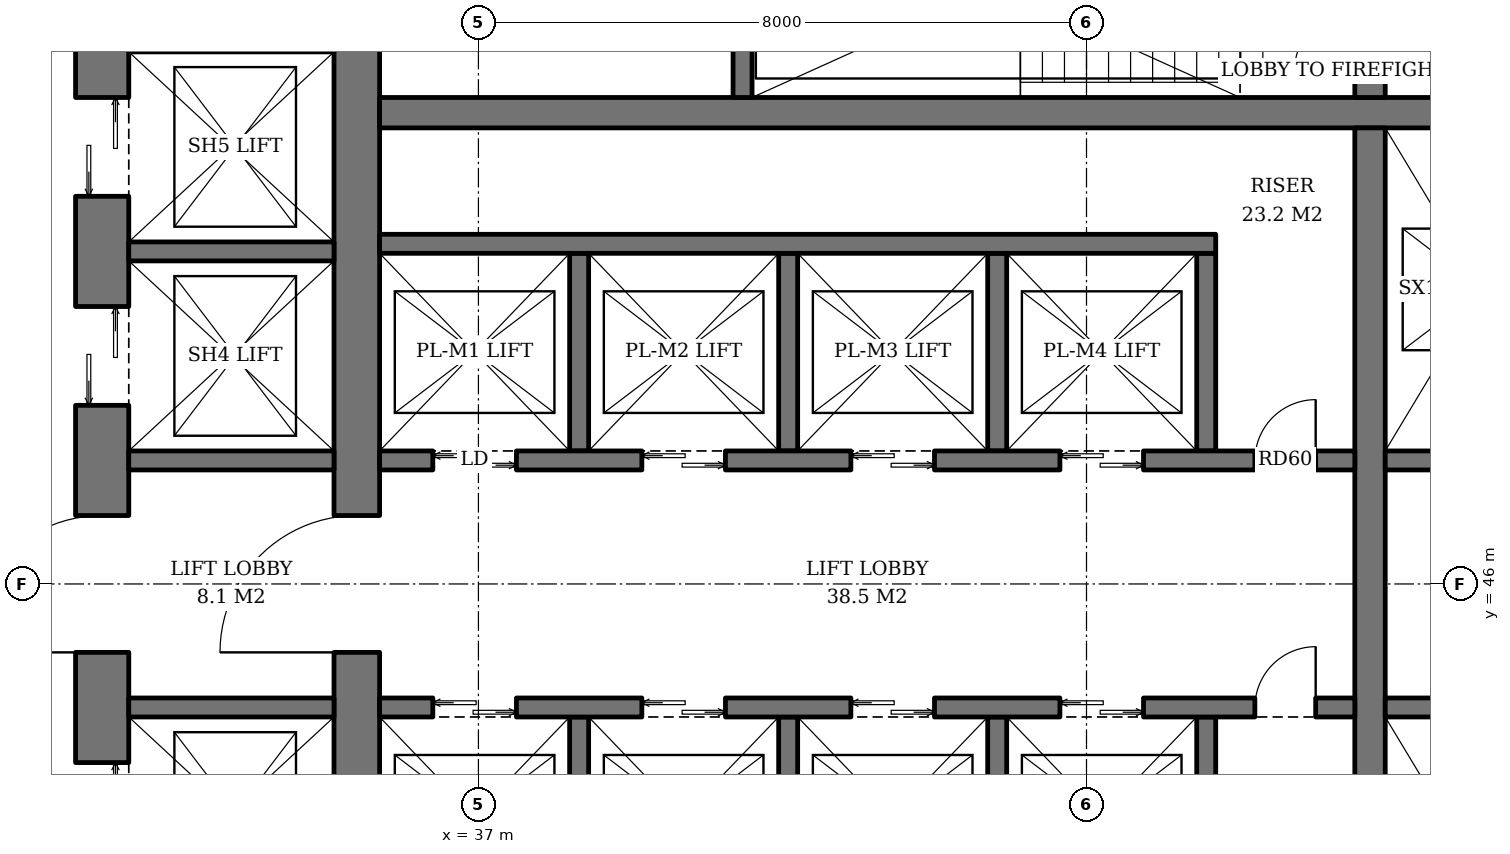
"""IFC4 building model, lengths in metres.
Left out: names, types, materials, properties, quantities, classifications, styles, units other than length and angle.
Written with IfcOpenShell. Run it as: python <this file> out.ifc"""

import sys

from ifc_helpers import new_model, si_unit, direction, frame, frame_2d, origin, place, context, subcontext, project, spatial, rectangle, extrude, element, fill, save


model = new_model("IFC4")
c1 = context("Model", 3, precision=1e-05, world=origin(), true_north=direction((0.0, 1.0)))
c2 = subcontext(c1, "Body", "Model", "MODEL_VIEW")
j1 = project(units=[si_unit("LENGTHUNIT", "METRE"), si_unit("PLANEANGLEUNIT", "RADIAN")], contexts=[c1])
p1 = place(None, origin())
s1 = spatial("IfcSite", under=j1, at=p1, CompositionType="ELEMENT")
p2 = place(p1, origin())
s2 = spatial("IfcBuilding", under=s1, at=p2, CompositionType="ELEMENT")
p3 = place(p2, frame((0.0, 0.0, 93.2)))
s3 = spatial("IfcBuildingStorey", under=s2, at=p3, CompositionType="ELEMENT", Elevation=93.2)
p4 = place(p3, frame((35.4, 36.7, 0.0), z_axis=(0.0, 0.0, 1.0), x_axis=(0.0, 1.0, 0.0)))
e1 = element("IfcWall", 1, at=p4, inside=s3, PredefinedType="SHEAR", context=c2, shape_type="SweptSolid", body=[
    extrude(rectangle(XDim=18.6, YDim=0.6, at=frame_2d((9.3, 0.0))), origin(), (0.0, 0.0, 1.0), 3.8),
])
p5 = place(p4, frame((8.4, 0.0, 0.0)))
e2 = element("IfcOpeningElement", 2, at=p5, cuts=e1, PredefinedType="OPENING", context=c2, shape_type="SweptSolid", body=[
    extrude(rectangle(XDim=1.8, YDim=2.4, at=frame_2d((0.9, 1.2))), frame((0.0, 0.31, 0.0), z_axis=(0.0, -1.0, 0.0), x_axis=(1.0, 0.0, 0.0)), (0.0, 0.0, 1.0), 0.62),
])
p6 = place(p3, frame((32.05, 33.4, 0.0), z_axis=(0.0, 0.0, 1.0), x_axis=(0.0, 1.0, 0.0)))
e3 = element("IfcWall", 3, at=p6, inside=s3, PredefinedType="SHEAR", context=c2, shape_type="SweptSolid", body=[
    extrude(rectangle(XDim=25.2, YDim=0.7, at=frame_2d((12.6, 0.0))), origin(), (0.0, 0.0, 1.0), 3.8),
])
p7 = place(p6, frame((3.45, 0.0, 0.0)))
e4 = element("IfcOpeningElement", 4, at=p7, cuts=e3, PredefinedType="OPENING", context=c2, shape_type="SweptSolid", body=[
    extrude(rectangle(XDim=1.3, YDim=2.2, at=frame_2d((0.65, 1.1))), frame((0.0, 0.36, 0.0), z_axis=(0.0, -1.0, 0.0), x_axis=(1.0, 0.0, 0.0)), (0.0, 0.0, 1.0), 0.72),
])
p8 = place(p6, frame((6.2, 0.0, 0.0)))
e5 = element("IfcOpeningElement", 5, at=p8, cuts=e3, PredefinedType="OPENING", context=c2, shape_type="SweptSolid", body=[
    extrude(rectangle(XDim=1.3, YDim=2.2, at=frame_2d((0.65, 1.1))), frame((0.0, 0.36, 0.0), z_axis=(0.0, -1.0, 0.0), x_axis=(1.0, 0.0, 0.0)), (0.0, 0.0, 1.0), 0.72),
])
p9 = place(p6, frame((8.95, 0.0, 0.0)))
e6 = element("IfcOpeningElement", 6, at=p9, cuts=e3, PredefinedType="OPENING", context=c2, shape_type="SweptSolid", body=[
    extrude(rectangle(XDim=1.3, YDim=2.2, at=frame_2d((0.65, 1.1))), frame((0.0, 0.36, 0.0), z_axis=(0.0, -1.0, 0.0), x_axis=(1.0, 0.0, 0.0)), (0.0, 0.0, 1.0), 0.72),
])
p10 = place(p6, frame((14.95, 0.0, 0.0)))
e7 = element("IfcOpeningElement", 7, at=p10, cuts=e3, PredefinedType="OPENING", context=c2, shape_type="SweptSolid", body=[
    extrude(rectangle(XDim=1.3, YDim=2.2, at=frame_2d((0.65, 1.1))), frame((0.0, 0.36, 0.0), z_axis=(0.0, -1.0, 0.0), x_axis=(1.0, 0.0, 0.0)), (0.0, 0.0, 1.0), 0.72),
])
p11 = place(p6, frame((17.7, 0.0, 0.0)))
e8 = element("IfcOpeningElement", 8, at=p11, cuts=e3, PredefinedType="OPENING", context=c2, shape_type="SweptSolid", body=[
    extrude(rectangle(XDim=1.3, YDim=2.2, at=frame_2d((0.65, 1.1))), frame((0.0, 0.36, 0.0), z_axis=(0.0, -1.0, 0.0), x_axis=(1.0, 0.0, 0.0)), (0.0, 0.0, 1.0), 0.72),
])
p12 = place(p6, frame((11.7, 0.0, 0.0)))
e9 = element("IfcOpeningElement", 9, at=p12, cuts=e3, PredefinedType="OPENING", context=c2, shape_type="SweptSolid", body=[
    extrude(rectangle(XDim=1.8, YDim=2.4, at=frame_2d((0.9, 1.2))), frame((0.0, 0.36, 0.0), z_axis=(0.0, -1.0, 0.0), x_axis=(1.0, 0.0, 0.0)), (0.0, 0.0, 1.0), 0.72),
])
p13 = place(p3, frame((35.7, 52.2, 0.0), z_axis=(0.0, 0.0, 1.0), x_axis=(1.0, 0.0, 0.0)))
e10 = element("IfcWall", 10, at=p13, inside=s3, PredefinedType="SHEAR", context=c2, shape_type="SweptSolid", body=[
    extrude(rectangle(XDim=18.6, YDim=0.4, at=frame_2d((9.3, 0.0))), origin(), (0.0, 0.0, 1.0), 3.8),
])
p14 = place(p3, frame((48.73, 40.0, 0.0), z_axis=(0.0, 0.0, 1.0), x_axis=(0.0, 1.0, 0.0)))
e11 = element("IfcWall", 11, at=p14, inside=s3, PredefinedType="SHEAR", context=c2, shape_type="SweptSolid", body=[
    extrude(rectangle(XDim=12.0, YDim=0.4, at=frame_2d((6.0, 0.0))), origin(), (0.0, 0.0, 1.0), 3.8),
])
p15 = place(p3, frame((48.73, 52.4, 0.0), z_axis=(0.0, 0.0, 1.0), x_axis=(0.0, 1.0, 0.0)))
e12 = element("IfcWall", 12, at=p15, inside=s3, PredefinedType="SHEAR", context=c2, shape_type="SweptSolid", body=[
    extrude(rectangle(XDim=2.9, YDim=0.4, at=frame_2d((1.45, 0.0))), origin(), (0.0, 0.0, 1.0), 3.8),
])
p16 = place(p15, frame((0.3, 0.0, 0.0)))
e13 = element("IfcOpeningElement", 13, at=p16, cuts=e12, PredefinedType="OPENING", context=c2, shape_type="SweptSolid", body=[
    extrude(rectangle(XDim=1.0, YDim=2.1, at=frame_2d((0.5, 1.05))), frame((0.0, 0.21, 0.0), z_axis=(0.0, -1.0, 0.0), x_axis=(1.0, 0.0, 0.0)), (0.0, 0.0, 1.0), 0.42),
])
p17 = place(p3, frame((40.475, 52.4, 0.0), z_axis=(0.0, 0.0, 1.0), x_axis=(0.0, 1.0, 0.0)))
e14 = element("IfcWall", 14, at=p17, inside=s3, PredefinedType="SHEAR", context=c2, shape_type="SweptSolid", body=[
    extrude(rectangle(XDim=2.9, YDim=0.25, at=frame_2d((1.45, 0.0))), origin(), (0.0, 0.0, 1.0), 3.8),
])
for number, where, z_axis, x_axis in (
    (15, (38.325, 47.75, 0.0), (0.0, 0.0, 1.0), (0.0, 1.0, 0.0)),
    (16, (41.075, 47.75, 0.0), (0.0, 0.0, 1.0), (0.0, 1.0, 0.0)),
    (17, (43.825, 47.75, 0.0), (0.0, 0.0, 1.0), (0.0, 1.0, 0.0)),
    (18, (46.575, 47.75, 0.0), (0.0, 0.0, 1.0), (0.0, 1.0, 0.0)),
):
    element("IfcWall", number, at=place(p3, frame(where, z_axis=z_axis, x_axis=x_axis)), inside=s3, PredefinedType="SHEAR", context=c2, shape_type="SweptSolid", body=[
        extrude(rectangle(XDim=2.6, YDim=0.25, at=frame_2d((1.3, 0.0))), origin(), (0.0, 0.0, 1.0), 3.8),
    ])
p18 = place(p3, frame((35.7, 50.475, 0.0), z_axis=(0.0, 0.0, 1.0), x_axis=(1.0, 0.0, 0.0)))
e19 = element("IfcWall", 19, at=p18, inside=s3, PredefinedType="SHEAR", context=c2, shape_type="SweptSolid", body=[
    extrude(rectangle(XDim=11.0, YDim=0.25, at=frame_2d((5.5, 0.0))), origin(), (0.0, 0.0, 1.0), 3.8),
])
p19 = place(p3, frame((35.7, 47.625, 0.0), z_axis=(0.0, 0.0, 1.0), x_axis=(1.0, 0.0, 0.0)))
e20 = element("IfcWall", 20, at=p19, inside=s3, PredefinedType="SHEAR", context=c2, shape_type="SweptSolid", body=[
    extrude(rectangle(XDim=12.83, YDim=0.25, at=frame_2d((6.415, 0.0))), origin(), (0.0, 0.0, 1.0), 3.8),
])
p20 = place(p19, frame((0.7, 0.0, 0.0)))
e21 = element("IfcOpeningElement", 21, at=p20, cuts=e20, PredefinedType="OPENING", context=c2, shape_type="SweptSolid", body=[
    extrude(rectangle(XDim=1.1, YDim=2.2, at=frame_2d((0.55, 1.1))), frame((0.0, 0.135, 0.0), z_axis=(0.0, -1.0, 0.0), x_axis=(1.0, 0.0, 0.0)), (0.0, 0.0, 1.0), 0.27),
])
p21 = place(p19, frame((3.45, 0.0, 0.0)))
e22 = element("IfcOpeningElement", 22, at=p21, cuts=e20, PredefinedType="OPENING", context=c2, shape_type="SweptSolid", body=[
    extrude(rectangle(XDim=1.1, YDim=2.2, at=frame_2d((0.55, 1.1))), frame((0.0, 0.135, 0.0), z_axis=(0.0, -1.0, 0.0), x_axis=(1.0, 0.0, 0.0)), (0.0, 0.0, 1.0), 0.27),
])
p22 = place(p19, frame((6.2, 0.0, 0.0)))
e23 = element("IfcOpeningElement", 23, at=p22, cuts=e20, PredefinedType="OPENING", context=c2, shape_type="SweptSolid", body=[
    extrude(rectangle(XDim=1.1, YDim=2.2, at=frame_2d((0.55, 1.1))), frame((0.0, 0.135, 0.0), z_axis=(0.0, -1.0, 0.0), x_axis=(1.0, 0.0, 0.0)), (0.0, 0.0, 1.0), 0.27),
])
p23 = place(p19, frame((8.95, 0.0, 0.0)))
e24 = element("IfcOpeningElement", 24, at=p23, cuts=e20, PredefinedType="OPENING", context=c2, shape_type="SweptSolid", body=[
    extrude(rectangle(XDim=1.1, YDim=2.2, at=frame_2d((0.55, 1.1))), frame((0.0, 0.135, 0.0), z_axis=(0.0, -1.0, 0.0), x_axis=(1.0, 0.0, 0.0)), (0.0, 0.0, 1.0), 0.27),
])
p24 = place(p19, frame((11.515, 0.0, 0.0)))
e25 = element("IfcOpeningElement", 25, at=p24, cuts=e20, PredefinedType="OPENING", context=c2, shape_type="SweptSolid", body=[
    extrude(rectangle(XDim=0.8, YDim=2.0, at=frame_2d((0.4, 1.0))), frame((0.0, 0.135, 0.0), z_axis=(0.0, -1.0, 0.0), x_axis=(1.0, 0.0, 0.0)), (0.0, 0.0, 1.0), 0.27),
])
for number, where, z_axis, x_axis in (
    (26, (38.325, 44.25, 0.0), (0.0, 0.0, 1.0), (0.0, -1.0, 0.0)),
    (27, (41.075, 44.25, 0.0), (0.0, 0.0, 1.0), (0.0, -1.0, 0.0)),
    (28, (43.825, 44.25, 0.0), (0.0, 0.0, 1.0), (0.0, -1.0, 0.0)),
    (29, (46.575, 44.25, 0.0), (0.0, 0.0, 1.0), (0.0, -1.0, 0.0)),
):
    element("IfcWall", number, at=place(p3, frame(where, z_axis=z_axis, x_axis=x_axis)), inside=s3, PredefinedType="SHEAR", context=c2, shape_type="SweptSolid", body=[
        extrude(rectangle(XDim=2.6, YDim=0.25, at=frame_2d((1.3, 0.0))), origin(), (0.0, 0.0, 1.0), 3.8),
    ])
p25 = place(p3, frame((35.7, 44.375, 0.0), z_axis=(0.0, 0.0, 1.0), x_axis=(1.0, 0.0, 0.0)))
e30 = element("IfcWall", 30, at=p25, inside=s3, PredefinedType="SHEAR", context=c2, shape_type="SweptSolid", body=[
    extrude(rectangle(XDim=12.83, YDim=0.25, at=frame_2d((6.415, 0.0))), origin(), (0.0, 0.0, 1.0), 3.8),
])
p26 = place(p25, frame((0.7, 0.0, 0.0)))
e31 = element("IfcOpeningElement", 31, at=p26, cuts=e30, PredefinedType="OPENING", context=c2, shape_type="SweptSolid", body=[
    extrude(rectangle(XDim=1.1, YDim=2.2, at=frame_2d((0.55, 1.1))), frame((0.0, 0.135, 0.0), z_axis=(0.0, -1.0, 0.0), x_axis=(1.0, 0.0, 0.0)), (0.0, 0.0, 1.0), 0.27),
])
p27 = place(p25, frame((3.45, 0.0, 0.0)))
e32 = element("IfcOpeningElement", 32, at=p27, cuts=e30, PredefinedType="OPENING", context=c2, shape_type="SweptSolid", body=[
    extrude(rectangle(XDim=1.1, YDim=2.2, at=frame_2d((0.55, 1.1))), frame((0.0, 0.135, 0.0), z_axis=(0.0, -1.0, 0.0), x_axis=(1.0, 0.0, 0.0)), (0.0, 0.0, 1.0), 0.27),
])
p28 = place(p25, frame((6.2, 0.0, 0.0)))
e33 = element("IfcOpeningElement", 33, at=p28, cuts=e30, PredefinedType="OPENING", context=c2, shape_type="SweptSolid", body=[
    extrude(rectangle(XDim=1.1, YDim=2.2, at=frame_2d((0.55, 1.1))), frame((0.0, 0.135, 0.0), z_axis=(0.0, -1.0, 0.0), x_axis=(1.0, 0.0, 0.0)), (0.0, 0.0, 1.0), 0.27),
])
p29 = place(p25, frame((8.95, 0.0, 0.0)))
e34 = element("IfcOpeningElement", 34, at=p29, cuts=e30, PredefinedType="OPENING", context=c2, shape_type="SweptSolid", body=[
    extrude(rectangle(XDim=1.1, YDim=2.2, at=frame_2d((0.55, 1.1))), frame((0.0, 0.135, 0.0), z_axis=(0.0, -1.0, 0.0), x_axis=(1.0, 0.0, 0.0)), (0.0, 0.0, 1.0), 0.27),
])
p30 = place(p25, frame((11.515, 0.0, 0.0)))
e35 = element("IfcOpeningElement", 35, at=p30, cuts=e30, PredefinedType="OPENING", context=c2, shape_type="SweptSolid", body=[
    extrude(rectangle(XDim=0.8, YDim=2.0, at=frame_2d((0.4, 1.0))), frame((0.0, 0.135, 0.0), z_axis=(0.0, -1.0, 0.0), x_axis=(1.0, 0.0, 0.0)), (0.0, 0.0, 1.0), 0.27),
])
for number, where, z_axis, x_axis in (
    (36, (48.93, 47.625, 0.0), (0.0, 0.0, 1.0), (1.0, 0.0, 0.0)),
    (37, (48.93, 44.375, 0.0), (0.0, 0.0, 1.0), (1.0, 0.0, 0.0)),
):
    element("IfcWall", number, at=place(p3, frame(where, z_axis=z_axis, x_axis=x_axis)), inside=s3, PredefinedType="SHEAR", context=c2, shape_type="SweptSolid", body=[
        extrude(rectangle(XDim=5.37, YDim=0.25, at=frame_2d((2.685, 0.0))), origin(), (0.0, 0.0, 1.0), 3.8),
    ])
for number, where, z_axis, x_axis in (
    (38, (32.4, 44.375, 0.0), (0.0, 0.0, 1.0), (1.0, 0.0, 0.0)),
    (39, (32.4, 47.625, 0.0), (0.0, 0.0, 1.0), (1.0, 0.0, 0.0)),
    (40, (32.4, 50.375, 0.0), (0.0, 0.0, 1.0), (1.0, 0.0, 0.0)),
):
    element("IfcWall", number, at=place(p3, frame(where, z_axis=z_axis, x_axis=x_axis)), inside=s3, PredefinedType="SHEAR", context=c2, shape_type="SweptSolid", body=[
        extrude(rectangle(XDim=2.7, YDim=0.25, at=frame_2d((1.35, 0.0))), origin(), (0.0, 0.0, 1.0), 3.8),
    ])
p31 = place(p20, origin())
e41 = element("IfcDoor", 41, at=p31, inside=s3, OperationType="DOUBLE_DOOR_SLIDING", PredefinedType="DOOR", context=c2, shape_type="SweptSolid", body=[
    extrude(rectangle(XDim=1.1, YDim=2.2, at=frame_2d((0.55, 1.1))), frame((0.0, 0.025, 0.0), z_axis=(0.0, -1.0, 0.0), x_axis=(1.0, 0.0, 0.0)), (0.0, 0.0, 1.0), 0.05),
])
fill(e21, e41)
p32 = place(p21, origin())
e42 = element("IfcDoor", 42, at=p32, inside=s3, OperationType="DOUBLE_DOOR_SLIDING", PredefinedType="DOOR", context=c2, shape_type="SweptSolid", body=[
    extrude(rectangle(XDim=1.1, YDim=2.2, at=frame_2d((0.55, 1.1))), frame((0.0, 0.025, 0.0), z_axis=(0.0, -1.0, 0.0), x_axis=(1.0, 0.0, 0.0)), (0.0, 0.0, 1.0), 0.05),
])
fill(e22, e42)
p33 = place(p22, origin())
e43 = element("IfcDoor", 43, at=p33, inside=s3, OperationType="DOUBLE_DOOR_SLIDING", PredefinedType="DOOR", context=c2, shape_type="SweptSolid", body=[
    extrude(rectangle(XDim=1.1, YDim=2.2, at=frame_2d((0.55, 1.1))), frame((0.0, 0.025, 0.0), z_axis=(0.0, -1.0, 0.0), x_axis=(1.0, 0.0, 0.0)), (0.0, 0.0, 1.0), 0.05),
])
fill(e23, e43)
p34 = place(p23, origin())
e44 = element("IfcDoor", 44, at=p34, inside=s3, OperationType="DOUBLE_DOOR_SLIDING", PredefinedType="DOOR", context=c2, shape_type="SweptSolid", body=[
    extrude(rectangle(XDim=1.1, YDim=2.2, at=frame_2d((0.55, 1.1))), frame((0.0, 0.025, 0.0), z_axis=(0.0, -1.0, 0.0), x_axis=(1.0, 0.0, 0.0)), (0.0, 0.0, 1.0), 0.05),
])
fill(e24, e44)
p35 = place(p24, origin())
e45 = element("IfcDoor", 45, at=p35, inside=s3, OperationType="SINGLE_SWING_RIGHT", PredefinedType="DOOR", context=c2, shape_type="SweptSolid", body=[
    extrude(rectangle(XDim=0.8, YDim=2.0, at=frame_2d((0.4, 1.0))), frame((0.0, 0.025, 0.0), z_axis=(0.0, -1.0, 0.0), x_axis=(1.0, 0.0, 0.0)), (0.0, 0.0, 1.0), 0.05),
])
fill(e25, e45)
p36 = place(p26, origin())
e46 = element("IfcDoor", 46, at=p36, inside=s3, OperationType="DOUBLE_DOOR_SLIDING", PredefinedType="DOOR", context=c2, shape_type="SweptSolid", body=[
    extrude(rectangle(XDim=1.1, YDim=2.2, at=frame_2d((0.55, 1.1))), frame((0.0, 0.025, 0.0), z_axis=(0.0, -1.0, 0.0), x_axis=(1.0, 0.0, 0.0)), (0.0, 0.0, 1.0), 0.05),
])
fill(e31, e46)
p37 = place(p27, origin())
e47 = element("IfcDoor", 47, at=p37, inside=s3, OperationType="DOUBLE_DOOR_SLIDING", PredefinedType="DOOR", context=c2, shape_type="SweptSolid", body=[
    extrude(rectangle(XDim=1.1, YDim=2.2, at=frame_2d((0.55, 1.1))), frame((0.0, 0.025, 0.0), z_axis=(0.0, -1.0, 0.0), x_axis=(1.0, 0.0, 0.0)), (0.0, 0.0, 1.0), 0.05),
])
fill(e32, e47)
p38 = place(p28, origin())
e48 = element("IfcDoor", 48, at=p38, inside=s3, OperationType="DOUBLE_DOOR_SLIDING", PredefinedType="DOOR", context=c2, shape_type="SweptSolid", body=[
    extrude(rectangle(XDim=1.1, YDim=2.2, at=frame_2d((0.55, 1.1))), frame((0.0, 0.025, 0.0), z_axis=(0.0, -1.0, 0.0), x_axis=(1.0, 0.0, 0.0)), (0.0, 0.0, 1.0), 0.05),
])
fill(e33, e48)
p39 = place(p29, origin())
e49 = element("IfcDoor", 49, at=p39, inside=s3, OperationType="DOUBLE_DOOR_SLIDING", PredefinedType="DOOR", context=c2, shape_type="SweptSolid", body=[
    extrude(rectangle(XDim=1.1, YDim=2.2, at=frame_2d((0.55, 1.1))), frame((0.0, 0.025, 0.0), z_axis=(0.0, -1.0, 0.0), x_axis=(1.0, 0.0, 0.0)), (0.0, 0.0, 1.0), 0.05),
])
fill(e34, e49)
p40 = place(p30, origin())
e50 = element("IfcDoor", 50, at=p40, inside=s3, OperationType="SINGLE_SWING_RIGHT", PredefinedType="DOOR", context=c2, shape_type="SweptSolid", body=[
    extrude(rectangle(XDim=0.8, YDim=2.0, at=frame_2d((0.4, 1.0))), frame((0.0, 0.025, 0.0), z_axis=(0.0, -1.0, 0.0), x_axis=(1.0, 0.0, 0.0)), (0.0, 0.0, 1.0), 0.05),
])
fill(e35, e50)
p41 = place(p16, origin())
e51 = element("IfcDoor", 51, at=p41, inside=s3, OperationType="SINGLE_SWING_LEFT", PredefinedType="DOOR", context=c2, shape_type="SweptSolid", body=[
    extrude(rectangle(XDim=1.0, YDim=2.1, at=frame_2d((0.5, 1.05))), frame((0.0, 0.025, 0.0), z_axis=(0.0, -1.0, 0.0), x_axis=(1.0, 0.0, 0.0)), (0.0, 0.0, 1.0), 0.05),
])
fill(e13, e51)
p42 = place(p5, origin())
e52 = element("IfcDoor", 52, at=p42, inside=s3, OperationType="DOUBLE_DOOR_SINGLE_SWING", PredefinedType="DOOR", context=c2, shape_type="SweptSolid", body=[
    extrude(rectangle(XDim=1.8, YDim=2.4, at=frame_2d((0.9, 1.2))), frame((0.0, 0.025, 0.0), z_axis=(0.0, -1.0, 0.0), x_axis=(1.0, 0.0, 0.0)), (0.0, 0.0, 1.0), 0.05),
])
fill(e2, e52)
p43 = place(p9, origin())
e53 = element("IfcDoor", 53, at=p43, inside=s3, OperationType="DOUBLE_DOOR_SLIDING", PredefinedType="DOOR", context=c2, shape_type="SweptSolid", body=[
    extrude(rectangle(XDim=1.3, YDim=2.2, at=frame_2d((0.65, 1.1))), frame((0.0, 0.025, 0.0), z_axis=(0.0, -1.0, 0.0), x_axis=(1.0, 0.0, 0.0)), (0.0, 0.0, 1.0), 0.05),
])
fill(e6, e53)
p44 = place(p10, origin())
e54 = element("IfcDoor", 54, at=p44, inside=s3, OperationType="DOUBLE_DOOR_SLIDING", PredefinedType="DOOR", context=c2, shape_type="SweptSolid", body=[
    extrude(rectangle(XDim=1.3, YDim=2.2, at=frame_2d((0.65, 1.1))), frame((0.0, 0.025, 0.0), z_axis=(0.0, -1.0, 0.0), x_axis=(1.0, 0.0, 0.0)), (0.0, 0.0, 1.0), 0.05),
])
fill(e7, e54)
p45 = place(p11, origin())
e55 = element("IfcDoor", 55, at=p45, inside=s3, OperationType="DOUBLE_DOOR_SLIDING", PredefinedType="DOOR", context=c2, shape_type="SweptSolid", body=[
    extrude(rectangle(XDim=1.3, YDim=2.2, at=frame_2d((0.65, 1.1))), frame((0.0, 0.025, 0.0), z_axis=(0.0, -1.0, 0.0), x_axis=(1.0, 0.0, 0.0)), (0.0, 0.0, 1.0), 0.05),
])
fill(e8, e55)
p46 = place(p12, origin())
e56 = element("IfcDoor", 56, at=p46, inside=s3, OperationType="DOUBLE_DOOR_SINGLE_SWING", PredefinedType="DOOR", context=c2, shape_type="SweptSolid", body=[
    extrude(rectangle(XDim=1.8, YDim=2.4, at=frame_2d((0.9, 1.2))), frame((0.0, 0.025, 0.0), z_axis=(0.0, -1.0, 0.0), x_axis=(1.0, 0.0, 0.0)), (0.0, 0.0, 1.0), 0.05),
])
fill(e9, e56)
save(model, sys.argv[1])
